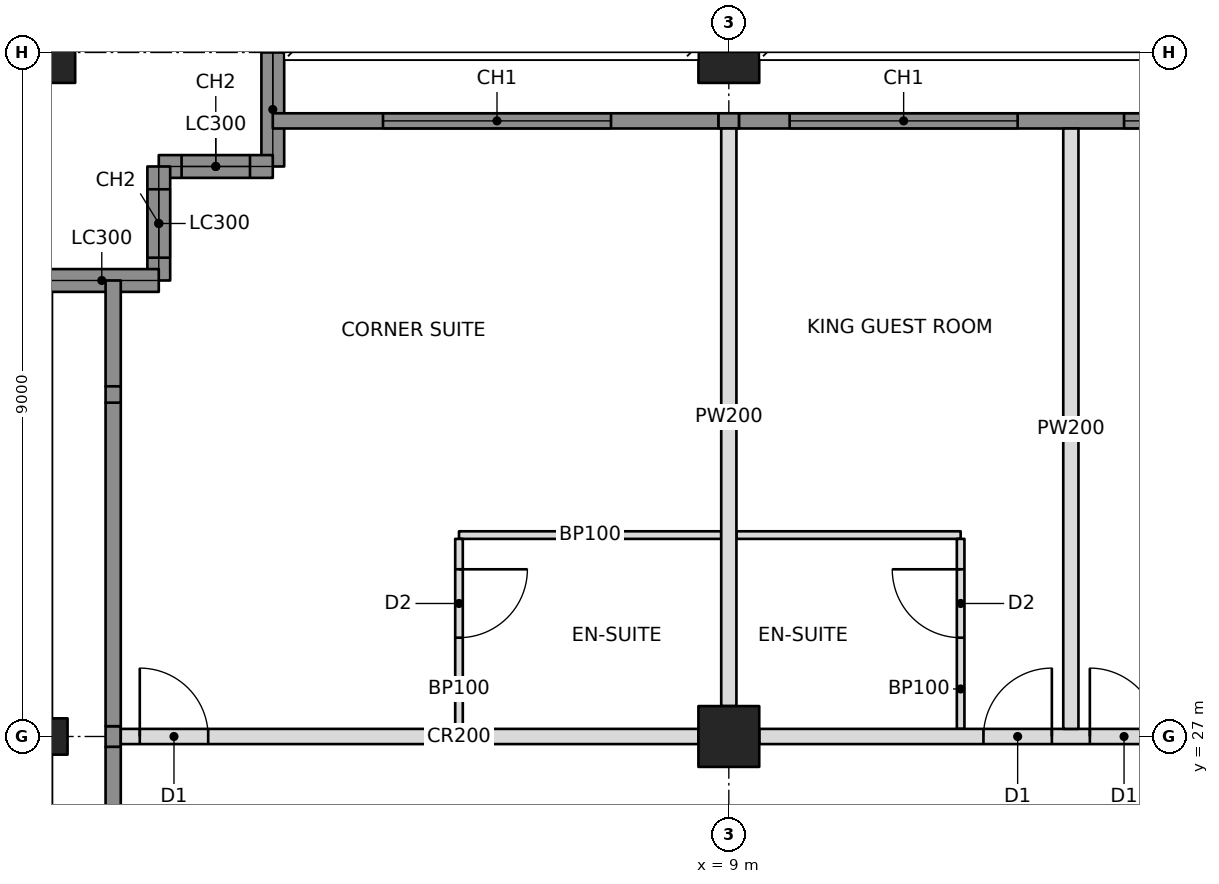
"""IFC4 building model, lengths in metres.
Left out: names, types, materials, properties, quantities, classifications, styles, units other than length and angle.
Written with IfcOpenShell. Run it as: python <this file> out.ifc"""

import sys

from ifc_helpers import new_model, si_unit, direction, frame, frame_2d, origin, origin_2d, place, context, subcontext, project, spatial, rectangle, hollow_rectangle, i_section, extrude, element, fill, save


model = new_model("IFC4")
c1 = context("Model", 3, precision=1e-05, world=origin(), true_north=direction((0.0, 1.0)))
c2 = subcontext(c1, "Body", "Model", "MODEL_VIEW")
j1 = project(units=[si_unit("LENGTHUNIT", "METRE"), si_unit("PLANEANGLEUNIT", "RADIAN")], contexts=[c1])
p1 = place(None, origin())
s1 = spatial("IfcSite", under=j1, at=p1, CompositionType="ELEMENT")
p2 = place(p1, origin())
s2 = spatial("IfcBuilding", under=s1, at=p2, CompositionType="ELEMENT")
p3 = place(p2, frame((0.0, 0.0, 51.8)))
s3 = spatial("IfcBuildingStorey", under=s2, at=p3, CompositionType="ELEMENT", Elevation=51.8)
p4 = place(p3, frame((0.0, 27.0, 0.0), z_axis=(0.0, 0.0, 1.0), x_axis=(0.0, 1.0, 0.0)))
e1 = element("IfcColumn", 1, at=p4, inside=s3, PredefinedType="COLUMN", context=c2, shape_type="SweptSolid", body=[
    extrude(i_section(OverallWidth=0.478, OverallDepth=0.599, WebThickness=0.1, FlangeThickness=0.14, at=origin_2d()), origin(), (0.0, 0.0, 1.0), 3.4),
])
for number, where, z_axis, x_axis in (
    (2, (0.0, 36.0, 0.0), (0.0, 0.0, 1.0), (1.0, 0.0, 0.0)),
    (3, (9.0, 27.0, 0.0), (0.0, 0.0, 1.0), (1.0, 0.0, 0.0)),
    (4, (9.0, 36.0, 0.0), (0.0, 0.0, 1.0), (1.0, 0.0, 0.0)),
):
    element("IfcColumn", number, at=place(p3, frame(where, z_axis=z_axis, x_axis=x_axis)), inside=s3, PredefinedType="COLUMN", context=c2, shape_type="SweptSolid", body=[
        extrude(hollow_rectangle(XDim=0.8, YDim=0.8, WallThickness=0.1, at=origin_2d()), origin(), (0.0, 0.0, 1.0), 3.4),
    ])
p5 = place(p3, frame((3.0, 36.0, 0.0), z_axis=(0.0, 0.0, 1.0), x_axis=(0.0, -1.0, 0.0)))
e5 = element("IfcWall", 5, at=p5, inside=s3, PredefinedType="SOLIDWALL", context=c2, shape_type="SweptSolid", body=[
    extrude(rectangle(XDim=1.5, YDim=0.3, at=frame_2d((0.75, 0.0))), origin(), (0.0, 0.0, 1.0), 2.42),
])
p6 = place(p3, frame((3.0, 34.5, 0.0), z_axis=(0.0, 0.0, 1.0), x_axis=(-1.0, 0.0, 0.0)))
e6 = element("IfcWall", 6, at=p6, inside=s3, PredefinedType="SOLIDWALL", context=c2, shape_type="SweptSolid", body=[
    extrude(rectangle(XDim=1.5, YDim=0.3, at=frame_2d((0.75, 0.0))), origin(), (0.0, 0.0, 1.0), 3.2),
])
p7 = place(p6, frame((0.3, 0.0, 0.6)))
e7 = element("IfcOpeningElement", 7, at=p7, cuts=e6, PredefinedType="OPENING", context=c2, shape_type="SweptSolid", body=[
    extrude(rectangle(XDim=0.9, YDim=2.2, at=frame_2d((0.45, 1.1))), frame((0.0, 0.16, 0.0), z_axis=(0.0, -1.0, 0.0), x_axis=(1.0, 0.0, 0.0)), (0.0, 0.0, 1.0), 0.32),
])
p8 = place(p3, frame((1.5, 34.5, 0.0), z_axis=(0.0, 0.0, 1.0), x_axis=(0.0, -1.0, 0.0)))
e8 = element("IfcWall", 8, at=p8, inside=s3, PredefinedType="SOLIDWALL", context=c2, shape_type="SweptSolid", body=[
    extrude(rectangle(XDim=1.5, YDim=0.3, at=frame_2d((0.75, 0.0))), origin(), (0.0, 0.0, 1.0), 3.2),
])
p9 = place(p8, frame((0.3, 0.0, 0.6)))
e9 = element("IfcOpeningElement", 9, at=p9, cuts=e8, PredefinedType="OPENING", context=c2, shape_type="SweptSolid", body=[
    extrude(rectangle(XDim=0.9, YDim=2.2, at=frame_2d((0.45, 1.1))), frame((0.0, 0.16, 0.0), z_axis=(0.0, -1.0, 0.0), x_axis=(1.0, 0.0, 0.0)), (0.0, 0.0, 1.0), 0.32),
])
p10 = place(p3, frame((1.5, 33.0, 0.0), z_axis=(0.0, 0.0, 1.0), x_axis=(-1.0, 0.0, 0.0)))
e10 = element("IfcWall", 10, at=p10, inside=s3, PredefinedType="SOLIDWALL", context=c2, shape_type="SweptSolid", body=[
    extrude(rectangle(XDim=1.5, YDim=0.3, at=frame_2d((0.75, 0.0))), origin(), (0.0, 0.0, 1.0), 2.42),
])
p11 = place(p3, frame((3.0, 35.1, 0.0), z_axis=(0.0, 0.0, 1.0), x_axis=(1.0, 0.0, 0.0)))
e11 = element("IfcWall", 11, at=p11, inside=s3, PredefinedType="SOLIDWALL", context=c2, shape_type="SweptSolid", body=[
    extrude(rectangle(XDim=5.865, YDim=0.2, at=frame_2d((2.932, 0.0))), origin(), (0.0, 0.0, 1.0), 3.2),
])
p12 = place(p11, frame((1.45, 0.0, 0.6)))
e12 = element("IfcOpeningElement", 12, at=p12, cuts=e11, PredefinedType="OPENING", context=c2, shape_type="SweptSolid", body=[
    extrude(rectangle(XDim=3.0, YDim=2.2, at=frame_2d((1.5, 1.1))), frame((0.0, 0.11, 0.0), z_axis=(0.0, -1.0, 0.0), x_axis=(1.0, 0.0, 0.0)), (0.0, 0.0, 1.0), 0.22),
])
p13 = place(p3, frame((1.0, 27.0, 0.0), z_axis=(0.0, 0.0, 1.0), x_axis=(1.0, 0.0, 0.0)))
e13 = element("IfcWall", 13, at=p13, inside=s3, PredefinedType="PARTITIONING", context=c2, shape_type="SweptSolid", body=[
    extrude(rectangle(XDim=7.6, YDim=0.2, at=frame_2d((3.8, 0.0))), origin(), (0.0, 0.0, 1.0), 2.438),
])
p14 = place(p13, frame((0.25, 0.0, 0.0)))
e14 = element("IfcOpeningElement", 14, at=p14, cuts=e13, PredefinedType="OPENING", context=c2, shape_type="SweptSolid", body=[
    extrude(rectangle(XDim=0.9, YDim=2.1, at=frame_2d((0.45, 1.05))), frame((0.0, 0.11, 0.0), z_axis=(0.0, -1.0, 0.0), x_axis=(1.0, 0.0, 0.0)), (0.0, 0.0, 1.0), 0.22),
])
p15 = place(p3, frame((9.4, 27.0, 0.0), z_axis=(0.0, 0.0, 1.0), x_axis=(1.0, 0.0, 0.0)))
e15 = element("IfcWall", 15, at=p15, inside=s3, PredefinedType="PARTITIONING", context=c2, shape_type="SweptSolid", body=[
    extrude(rectangle(XDim=8.2, YDim=0.2, at=frame_2d((4.1, 0.0))), origin(), (0.0, 0.0, 1.0), 2.405),
])
p16 = place(p15, frame((2.95, 0.0, 0.0)))
e16 = element("IfcOpeningElement", 16, at=p16, cuts=e15, PredefinedType="OPENING", context=c2, shape_type="SweptSolid", body=[
    extrude(rectangle(XDim=0.9, YDim=2.1, at=frame_2d((0.45, 1.05))), frame((0.0, 0.11, 0.0), z_axis=(0.0, -1.0, 0.0), x_axis=(1.0, 0.0, 0.0)), (0.0, 0.0, 1.0), 0.22),
])
p17 = place(p15, frame((4.35, 0.0, 0.0)))
e17 = element("IfcOpeningElement", 17, at=p17, cuts=e15, PredefinedType="OPENING", context=c2, shape_type="SweptSolid", body=[
    extrude(rectangle(XDim=0.9, YDim=2.1, at=frame_2d((0.45, 1.05))), frame((0.0, 0.11, 0.0), z_axis=(0.0, -1.0, 0.0), x_axis=(1.0, 0.0, 0.0)), (0.0, 0.0, 1.0), 0.22),
])
p18 = place(p3, frame((9.0, 27.4, 0.0), z_axis=(0.0, 0.0, 1.0), x_axis=(0.0, 1.0, 0.0)))
e18 = element("IfcWall", 18, at=p18, inside=s3, PredefinedType="PARTITIONING", context=c2, shape_type="SweptSolid", body=[
    extrude(rectangle(XDim=7.6, YDim=0.2, at=frame_2d((3.8, 0.0))), origin(), (0.0, 0.0, 1.0), 2.438),
])
p19 = place(p3, frame((13.5, 27.1, 0.0), z_axis=(0.0, 0.0, 1.0), x_axis=(0.0, 1.0, 0.0)))
e19 = element("IfcWall", 19, at=p19, inside=s3, PredefinedType="PARTITIONING", context=c2, shape_type="SweptSolid", body=[
    extrude(rectangle(XDim=7.9, YDim=0.2, at=frame_2d((3.95, 0.0))), origin(), (0.0, 0.0, 1.0), 2.404),
])
p20 = place(p3, frame((5.45, 29.65, 0.0), z_axis=(0.0, 0.0, 1.0), x_axis=(1.0, 0.0, 0.0)))
e20 = element("IfcWall", 20, at=p20, inside=s3, PredefinedType="PARTITIONING", context=c2, shape_type="SweptSolid", body=[
    extrude(rectangle(XDim=3.45, YDim=0.1, at=frame_2d((1.725, 0.0))), origin(), (0.0, 0.0, 1.0), 2.438),
])
p21 = place(p3, frame((5.45, 27.1, 0.0), z_axis=(0.0, 0.0, 1.0), x_axis=(0.0, 1.0, 0.0)))
e21 = element("IfcWall", 21, at=p21, inside=s3, PredefinedType="PARTITIONING", context=c2, shape_type="SweptSolid", body=[
    extrude(rectangle(XDim=2.5, YDim=0.1, at=frame_2d((1.25, 0.0))), origin(), (0.0, 0.0, 1.0), 2.438),
])
p22 = place(p21, frame((1.2, 0.0, 0.0)))
e22 = element("IfcOpeningElement", 22, at=p22, cuts=e21, PredefinedType="OPENING", context=c2, shape_type="SweptSolid", body=[
    extrude(rectangle(XDim=0.9, YDim=2.1, at=frame_2d((0.45, 1.05))), frame((0.0, 0.06, 0.0), z_axis=(0.0, -1.0, 0.0), x_axis=(1.0, 0.0, 0.0)), (0.0, 0.0, 1.0), 0.12),
])
p23 = place(p3, frame((9.1, 29.65, 0.0), z_axis=(0.0, 0.0, 1.0), x_axis=(1.0, 0.0, 0.0)))
e23 = element("IfcWall", 23, at=p23, inside=s3, PredefinedType="PARTITIONING", context=c2, shape_type="SweptSolid", body=[
    extrude(rectangle(XDim=2.95, YDim=0.1, at=frame_2d((1.475, 0.0))), origin(), (0.0, 0.0, 1.0), 2.438),
])
p24 = place(p3, frame((12.05, 27.1, 0.0), z_axis=(0.0, 0.0, 1.0), x_axis=(0.0, 1.0, 0.0)))
e24 = element("IfcWall", 24, at=p24, inside=s3, PredefinedType="PARTITIONING", context=c2, shape_type="SweptSolid", body=[
    extrude(rectangle(XDim=2.5, YDim=0.1, at=frame_2d((1.25, 0.0))), origin(), (0.0, 0.0, 1.0), 2.404),
])
p25 = place(p24, frame((1.2, 0.0, 0.0)))
e25 = element("IfcOpeningElement", 25, at=p25, cuts=e24, PredefinedType="OPENING", context=c2, shape_type="SweptSolid", body=[
    extrude(rectangle(XDim=0.9, YDim=2.1, at=frame_2d((0.45, 1.05))), frame((0.0, 0.06, 0.0), z_axis=(0.0, -1.0, 0.0), x_axis=(1.0, 0.0, 0.0)), (0.0, 0.0, 1.0), 0.12),
])
p26 = place(p3, frame((0.9, 18.194, 0.0), z_axis=(0.0, 0.0, 1.0), x_axis=(0.0, 1.0, 0.0)))
e26 = element("IfcWall", 26, at=p26, inside=s3, PredefinedType="SOLIDWALL", context=c2, shape_type="SweptSolid", body=[
    extrude(rectangle(XDim=8.671, YDim=0.2, at=frame_2d((4.335, 0.0))), origin(), (0.0, 0.0, 1.0), 3.2),
])
p27 = place(p26, frame((0.156, 0.0, 0.6)))
e27 = element("IfcOpeningElement", 27, at=p27, cuts=e26, PredefinedType="OPENING", context=c2, shape_type="SweptSolid", body=[
    extrude(rectangle(XDim=3.0, YDim=2.2, at=frame_2d((1.5, 1.1))), frame((0.0, 0.11, 0.0), z_axis=(0.0, -1.0, 0.0), x_axis=(1.0, 0.0, 0.0)), (0.0, 0.0, 1.0), 0.22),
])
p28 = place(p26, frame((3.656, 0.0, 0.6)))
e28 = element("IfcOpeningElement", 28, at=p28, cuts=e26, PredefinedType="OPENING", context=c2, shape_type="SweptSolid", body=[
    extrude(rectangle(XDim=3.0, YDim=2.2, at=frame_2d((1.5, 1.1))), frame((0.0, 0.11, 0.0), z_axis=(0.0, -1.0, 0.0), x_axis=(1.0, 0.0, 0.0)), (0.0, 0.0, 1.0), 0.22),
])
p29 = place(p3, frame((0.9, 26.865, 0.0), z_axis=(0.0, 0.0, 1.0), x_axis=(0.0, 1.0, 0.0)))
e29 = element("IfcWall", 29, at=p29, inside=s3, PredefinedType="SOLIDWALL", context=c2, shape_type="SweptSolid", body=[
    extrude(rectangle(XDim=0.271, YDim=0.2, at=frame_2d((0.135, 0.0))), origin(), (0.0, 0.0, 1.0), 2.438),
])
p30 = place(p3, frame((0.9, 27.135, 0.0), z_axis=(0.0, 0.0, 1.0), x_axis=(0.0, 1.0, 0.0)))
e30 = element("IfcWall", 30, at=p30, inside=s3, PredefinedType="SOLIDWALL", context=c2, shape_type="SweptSolid", body=[
    extrude(rectangle(XDim=4.257, YDim=0.2, at=frame_2d((2.129, 0.0))), origin(), (0.0, 0.0, 1.0), 3.2),
])
p31 = place(p3, frame((0.9, 31.393, 0.0), z_axis=(0.0, 0.0, 1.0), x_axis=(0.0, 1.0, 0.0)))
e31 = element("IfcWall", 31, at=p31, inside=s3, PredefinedType="SOLIDWALL", context=c2, shape_type="SweptSolid", body=[
    extrude(rectangle(XDim=0.215, YDim=0.2, at=frame_2d((0.107, 0.0))), origin(), (0.0, 0.0, 1.0), 2.661),
])
p32 = place(p3, frame((0.9, 31.607, 0.0), z_axis=(0.0, 0.0, 1.0), x_axis=(0.0, 1.0, 0.0)))
e32 = element("IfcWall", 32, at=p32, inside=s3, PredefinedType="SOLIDWALL", context=c2, shape_type="SweptSolid", body=[
    extrude(rectangle(XDim=1.393, YDim=0.2, at=frame_2d((0.696, 0.0))), origin(), (0.0, 0.0, 1.0), 3.2),
])
p33 = place(p3, frame((8.865, 35.1, 0.0), z_axis=(0.0, 0.0, 1.0), x_axis=(1.0, 0.0, 0.0)))
e33 = element("IfcWall", 33, at=p33, inside=s3, PredefinedType="SOLIDWALL", context=c2, shape_type="SweptSolid", body=[
    extrude(rectangle(XDim=0.271, YDim=0.2, at=frame_2d((0.135, 0.0))), origin(), (0.0, 0.0, 1.0), 2.438),
])
p34 = place(p3, frame((9.135, 35.1, 0.0), z_axis=(0.0, 0.0, 1.0), x_axis=(1.0, 0.0, 0.0)))
e34 = element("IfcWall", 34, at=p34, inside=s3, PredefinedType="SOLIDWALL", context=c2, shape_type="SweptSolid", body=[
    extrude(rectangle(XDim=8.671, YDim=0.2, at=frame_2d((4.335, 0.0))), origin(), (0.0, 0.0, 1.0), 3.2),
])
p35 = place(p34, frame((0.665, 0.0, 0.6)))
e35 = element("IfcOpeningElement", 35, at=p35, cuts=e34, PredefinedType="OPENING", context=c2, shape_type="SweptSolid", body=[
    extrude(rectangle(XDim=3.0, YDim=2.2, at=frame_2d((1.5, 1.1))), frame((0.0, 0.11, 0.0), z_axis=(0.0, -1.0, 0.0), x_axis=(1.0, 0.0, 0.0)), (0.0, 0.0, 1.0), 0.22),
])
p36 = place(p34, frame((5.065, 0.0, 0.6)))
e36 = element("IfcOpeningElement", 36, at=p36, cuts=e34, PredefinedType="OPENING", context=c2, shape_type="SweptSolid", body=[
    extrude(rectangle(XDim=3.0, YDim=2.2, at=frame_2d((1.5, 1.1))), frame((0.0, 0.11, 0.0), z_axis=(0.0, -1.0, 0.0), x_axis=(1.0, 0.0, 0.0)), (0.0, 0.0, 1.0), 0.22),
])
p37 = place(p7, origin())
e37 = element("IfcWindow", 37, at=p37, inside=s3, PartitioningType="SINGLE_PANEL", PredefinedType="WINDOW", context=c2, shape_type="SweptSolid", body=[
    extrude(rectangle(XDim=0.9, YDim=2.2, at=frame_2d((0.45, 1.1))), frame((0.0, 0.03, 0.0), z_axis=(0.0, -1.0, 0.0), x_axis=(1.0, 0.0, 0.0)), (0.0, 0.0, 1.0), 0.06),
])
fill(e7, e37)
p38 = place(p9, origin())
e38 = element("IfcWindow", 38, at=p38, inside=s3, PartitioningType="SINGLE_PANEL", PredefinedType="WINDOW", context=c2, shape_type="SweptSolid", body=[
    extrude(rectangle(XDim=0.9, YDim=2.2, at=frame_2d((0.45, 1.1))), frame((0.0, 0.03, 0.0), z_axis=(0.0, -1.0, 0.0), x_axis=(1.0, 0.0, 0.0)), (0.0, 0.0, 1.0), 0.06),
])
fill(e9, e38)
p39 = place(p12, origin())
e39 = element("IfcWindow", 39, at=p39, inside=s3, PartitioningType="TRIPLE_PANEL_VERTICAL", PredefinedType="WINDOW", context=c2, shape_type="SweptSolid", body=[
    extrude(rectangle(XDim=3.0, YDim=2.2, at=frame_2d((1.5, 1.1))), frame((0.0, 0.03, 0.0), z_axis=(0.0, -1.0, 0.0), x_axis=(1.0, 0.0, 0.0)), (0.0, 0.0, 1.0), 0.06),
])
fill(e12, e39)
p40 = place(p35, origin())
e40 = element("IfcWindow", 40, at=p40, inside=s3, PartitioningType="TRIPLE_PANEL_VERTICAL", PredefinedType="WINDOW", context=c2, shape_type="SweptSolid", body=[
    extrude(rectangle(XDim=3.0, YDim=2.2, at=frame_2d((1.5, 1.1))), frame((0.0, 0.03, 0.0), z_axis=(0.0, -1.0, 0.0), x_axis=(1.0, 0.0, 0.0)), (0.0, 0.0, 1.0), 0.06),
])
fill(e35, e40)
p41 = place(p36, origin())
e41 = element("IfcWindow", 41, at=p41, inside=s3, PartitioningType="TRIPLE_PANEL_VERTICAL", PredefinedType="WINDOW", context=c2, shape_type="SweptSolid", body=[
    extrude(rectangle(XDim=3.0, YDim=2.2, at=frame_2d((1.5, 1.1))), frame((0.0, 0.03, 0.0), z_axis=(0.0, -1.0, 0.0), x_axis=(1.0, 0.0, 0.0)), (0.0, 0.0, 1.0), 0.06),
])
fill(e36, e41)
p42 = place(p22, frame((0.9, 0.0, 0.0), z_axis=(0.0, 0.0, 1.0), x_axis=(-1.0, 0.0, 0.0)))
e42 = element("IfcDoor", 42, at=p42, inside=s3, OperationType="SINGLE_SWING_LEFT", PredefinedType="DOOR", context=c2, shape_type="SweptSolid", body=[
    extrude(rectangle(XDim=0.9, YDim=2.1, at=frame_2d((0.45, 1.05))), frame((0.0, 0.025, 0.0), z_axis=(0.0, -1.0, 0.0), x_axis=(1.0, 0.0, 0.0)), (0.0, 0.0, 1.0), 0.05),
])
fill(e22, e42)
p43 = place(p14, origin())
e43 = element("IfcDoor", 43, at=p43, inside=s3, OperationType="SINGLE_SWING_LEFT", PredefinedType="DOOR", context=c2, shape_type="SweptSolid", body=[
    extrude(rectangle(XDim=0.9, YDim=2.1, at=frame_2d((0.45, 1.05))), frame((0.0, 0.025, 0.0), z_axis=(0.0, -1.0, 0.0), x_axis=(1.0, 0.0, 0.0)), (0.0, 0.0, 1.0), 0.05),
])
fill(e14, e43)
p44 = place(p25, origin())
e44 = element("IfcDoor", 44, at=p44, inside=s3, OperationType="SINGLE_SWING_RIGHT", PredefinedType="DOOR", context=c2, shape_type="SweptSolid", body=[
    extrude(rectangle(XDim=0.9, YDim=2.1, at=frame_2d((0.45, 1.05))), frame((0.0, 0.025, 0.0), z_axis=(0.0, -1.0, 0.0), x_axis=(1.0, 0.0, 0.0)), (0.0, 0.0, 1.0), 0.05),
])
fill(e25, e44)
p45 = place(p16, origin())
e45 = element("IfcDoor", 45, at=p45, inside=s3, OperationType="SINGLE_SWING_RIGHT", PredefinedType="DOOR", context=c2, shape_type="SweptSolid", body=[
    extrude(rectangle(XDim=0.9, YDim=2.1, at=frame_2d((0.45, 1.05))), frame((0.0, 0.025, 0.0), z_axis=(0.0, -1.0, 0.0), x_axis=(1.0, 0.0, 0.0)), (0.0, 0.0, 1.0), 0.05),
])
fill(e16, e45)
p46 = place(p17, origin())
e46 = element("IfcDoor", 46, at=p46, inside=s3, OperationType="SINGLE_SWING_LEFT", PredefinedType="DOOR", context=c2, shape_type="SweptSolid", body=[
    extrude(rectangle(XDim=0.9, YDim=2.1, at=frame_2d((0.45, 1.05))), frame((0.0, 0.025, 0.0), z_axis=(0.0, -1.0, 0.0), x_axis=(1.0, 0.0, 0.0)), (0.0, 0.0, 1.0), 0.05),
])
fill(e17, e46)
save(model, sys.argv[1])
